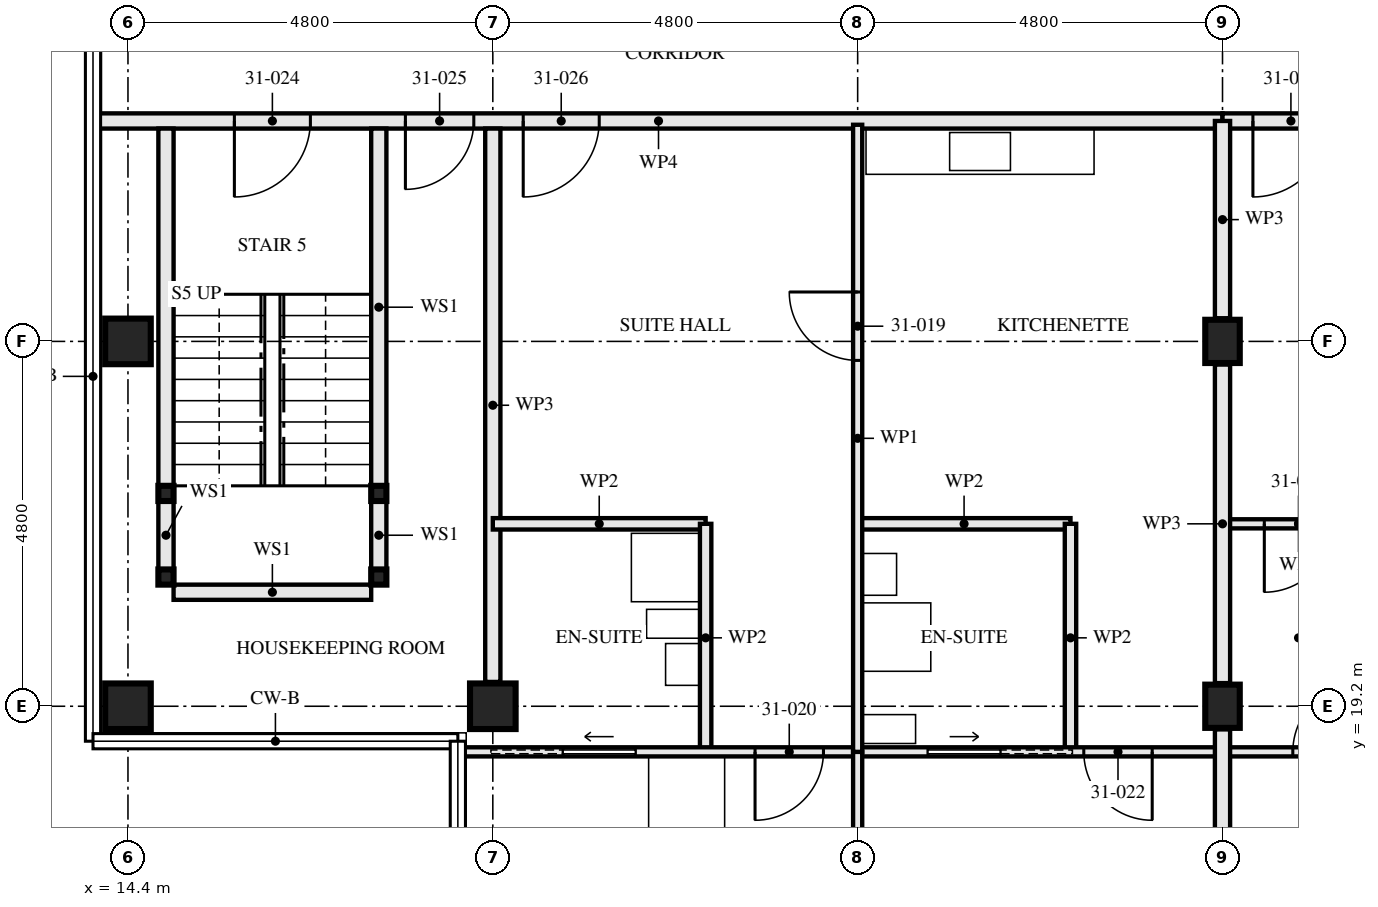
"""IFC4 building model, lengths in metres.
Left out: names, types, materials, properties, quantities, classifications, styles, units other than length and angle.
Written with IfcOpenShell. Run it as: python <this file> out.ifc"""

import sys

from ifc_helpers import new_model, si_unit, direction, frame, frame_2d, origin, origin_2d, place, context, subcontext, project, spatial, rectangle, hollow_rectangle, i_section, extrude, element, fill, save


model = new_model("IFC4")
c1 = context("Model", 3, precision=1e-05, world=origin(), true_north=direction((0.0, 1.0)))
c2 = subcontext(c1, "Body", "Model", "MODEL_VIEW")
j1 = project(units=[si_unit("LENGTHUNIT", "METRE"), si_unit("PLANEANGLEUNIT", "RADIAN")], contexts=[c1])
p1 = place(None, origin())
s1 = spatial("IfcSite", under=j1, at=p1, CompositionType="ELEMENT")
p2 = place(p1, origin())
s2 = spatial("IfcBuilding", under=s1, at=p2, CompositionType="ELEMENT")
p3 = place(p2, frame((0.0, 0.0, 115.5)))
s3 = spatial("IfcBuildingStorey", under=s2, at=p3, CompositionType="ELEMENT", Elevation=115.5)
for number, where, z_axis, x_axis in (
    (1, (14.4, 19.2, 0.0), (0.0, 0.0, 1.0), (0.0, 1.0, 0.0)),
    (2, (14.4, 24.0, 0.0), (0.0, 0.0, 1.0), (1.0, 0.0, 0.0)),
    (3, (19.2, 19.2, 0.0), (0.0, 0.0, 1.0), (0.0, 1.0, 0.0)),
):
    element("IfcColumn", number, at=place(p3, frame(where, z_axis=z_axis, x_axis=x_axis)), inside=s3, PredefinedType="COLUMN", context=c2, shape_type="SweptSolid", body=[
        extrude(hollow_rectangle(XDim=0.6, YDim=0.6, WallThickness=0.08, at=origin_2d()), origin(), (0.0, 0.0, 1.0), 3.5),
    ])
for number, where, z_axis, x_axis in (
    (4, (28.8, 19.2, 0.0), (0.0, 0.0, 1.0), (1.0, 0.0, 0.0)),
    (5, (28.8, 24.0, 0.0), (0.0, 0.0, 1.0), (1.0, 0.0, 0.0)),
):
    element("IfcColumn", number, at=place(p3, frame(where, z_axis=z_axis, x_axis=x_axis)), inside=s3, PredefinedType="COLUMN", context=c2, shape_type="SweptSolid", body=[
        extrude(i_section(OverallWidth=0.454, OverallDepth=0.569, WebThickness=0.078, FlangeThickness=0.125, FilletRadius=0.015, at=origin_2d()), origin(), (0.0, 0.0, 1.0), 3.5),
    ])
for number, where, z_axis, x_axis in (
    (6, (14.9, 20.9, 0.0), (0.0, 0.0, 1.0), (1.0, 0.0, 0.0)),
    (7, (17.7, 20.9, 0.0), (0.0, 0.0, 1.0), (1.0, 0.0, 0.0)),
    (8, (14.9, 22.0, 0.0), (0.0, 0.0, 1.0), (1.0, 0.0, 0.0)),
    (9, (17.7, 22.0, 0.0), (0.0, 0.0, 1.0), (1.0, 0.0, 0.0)),
):
    element("IfcColumn", number, at=place(p3, frame(where, z_axis=z_axis, x_axis=x_axis)), inside=s3, PredefinedType="COLUMN", context=c2, shape_type="SweptSolid", body=[
        extrude(hollow_rectangle(XDim=0.2, YDim=0.2, WallThickness=0.008, at=origin_2d()), origin(), (0.0, 0.0, 1.0), 3.33),
    ])
p4 = place(p3, frame((14.9, 21.0, 0.0), z_axis=(0.0, 0.0, 1.0), x_axis=(0.0, 1.0, 0.0)))
e10 = element("IfcWall", 10, at=p4, inside=s3, PredefinedType="SOLIDWALL", context=c2, shape_type="SweptSolid", body=[
    extrude(rectangle(XDim=0.9, YDim=0.2, at=frame_2d((0.45, 0.0))), origin(), (0.0, 0.0, 1.0), 2.99),
])
p5 = place(p3, frame((14.9, 22.1, 0.0), z_axis=(0.0, 0.0, 1.0), x_axis=(0.0, 1.0, 0.0)))
e11 = element("IfcWall", 11, at=p5, inside=s3, PredefinedType="SOLIDWALL", context=c2, shape_type="SweptSolid", body=[
    extrude(rectangle(XDim=4.7, YDim=0.2, at=frame_2d((2.35, 0.0))), origin(), (0.0, 0.0, 1.0), 2.99),
])
p6 = place(p3, frame((17.7, 21.0, 0.0), z_axis=(0.0, 0.0, 1.0), x_axis=(0.0, 1.0, 0.0)))
e12 = element("IfcWall", 12, at=p6, inside=s3, PredefinedType="SOLIDWALL", context=c2, shape_type="SweptSolid", body=[
    extrude(rectangle(XDim=0.9, YDim=0.2, at=frame_2d((0.45, 0.0))), origin(), (0.0, 0.0, 1.0), 2.99),
])
p7 = place(p3, frame((17.7, 22.1, 0.0), z_axis=(0.0, 0.0, 1.0), x_axis=(0.0, 1.0, 0.0)))
e13 = element("IfcWall", 13, at=p7, inside=s3, PredefinedType="SOLIDWALL", context=c2, shape_type="SweptSolid", body=[
    extrude(rectangle(XDim=4.7, YDim=0.2, at=frame_2d((2.35, 0.0))), origin(), (0.0, 0.0, 1.0), 2.99),
])
p8 = place(p3, frame((15.0, 20.7, 0.0), z_axis=(0.0, 0.0, 1.0), x_axis=(1.0, 0.0, 0.0)))
e14 = element("IfcWall", 14, at=p8, inside=s3, PredefinedType="SOLIDWALL", context=c2, shape_type="SweptSolid", body=[
    extrude(rectangle(XDim=2.6, YDim=0.2, at=frame_2d((1.3, 0.0))), origin(), (0.0, 0.0, 1.0), 3.33),
])
p9 = place(p3, frame((19.2, 19.52, 0.0), z_axis=(0.0, 0.0, 1.0), x_axis=(0.0, 1.0, 0.0)))
e15 = element("IfcWall", 15, at=p9, inside=s3, PredefinedType="PARTITIONING", context=c2, shape_type="SweptSolid", body=[
    extrude(rectangle(XDim=7.28, YDim=0.2, at=frame_2d((3.64, 0.0))), origin(), (0.0, 0.0, 1.0), 2.55),
])
p10 = place(p3, frame((22.0, 18.6, 0.0), z_axis=(0.0, 0.0, 1.0), x_axis=(0.0, 1.0, 0.0)))
e16 = element("IfcWall", 16, at=p10, inside=s3, PredefinedType="PARTITIONING", context=c2, shape_type="SweptSolid", body=[
    extrude(rectangle(XDim=3.0, YDim=0.15, at=frame_2d((1.5, 0.0))), origin(), (0.0, 0.0, 1.0), 2.55),
])
p11 = place(p3, frame((19.2, 21.6, 0.0), z_axis=(0.0, 0.0, 1.0), x_axis=(1.0, 0.0, 0.0)))
e17 = element("IfcWall", 17, at=p11, inside=s3, PredefinedType="PARTITIONING", context=c2, shape_type="SweptSolid", body=[
    extrude(rectangle(XDim=2.8, YDim=0.15, at=frame_2d((1.4, 0.0))), origin(), (0.0, 0.0, 1.0), 3.33),
])
p12 = place(p3, frame((26.8, 18.6, 0.0), z_axis=(0.0, 0.0, 1.0), x_axis=(0.0, 1.0, 0.0)))
e18 = element("IfcWall", 18, at=p12, inside=s3, PredefinedType="PARTITIONING", context=c2, shape_type="SweptSolid", body=[
    extrude(rectangle(XDim=3.0, YDim=0.15, at=frame_2d((1.5, 0.0))), origin(), (0.0, 0.0, 1.0), 2.55),
])
p13 = place(p3, frame((24.0, 21.6, 0.0), z_axis=(0.0, 0.0, 1.0), x_axis=(1.0, 0.0, 0.0)))
e19 = element("IfcWall", 19, at=p13, inside=s3, PredefinedType="PARTITIONING", context=c2, shape_type="SweptSolid", body=[
    extrude(rectangle(XDim=2.8, YDim=0.15, at=frame_2d((1.4, 0.0))), origin(), (0.0, 0.0, 1.0), 3.33),
])
p14 = place(p3, frame((24.0, 18.6, 0.0), z_axis=(0.0, 0.0, 1.0), x_axis=(0.0, 1.0, 0.0)))
e20 = element("IfcWall", 20, at=p14, inside=s3, PredefinedType="PARTITIONING", context=c2, shape_type="SweptSolid", body=[
    extrude(rectangle(XDim=8.25, YDim=0.12, at=frame_2d((4.125, 0.0))), origin(), (0.0, 0.0, 1.0), 2.55),
])
p15 = place(p14, frame((5.15, 0.0, 0.0)))
e21 = element("IfcOpeningElement", 21, at=p15, cuts=e20, PredefinedType="OPENING", context=c2, shape_type="SweptSolid", body=[
    extrude(rectangle(XDim=0.9, YDim=2.1, at=frame_2d((0.45, 1.05))), frame((0.0, 0.071, 0.0), z_axis=(0.0, -1.0, 0.0), x_axis=(1.0, 0.0, 0.0)), (0.0, 0.0, 1.0), 0.141),
])
p16 = place(p3, frame((18.76, 18.6, 0.0), z_axis=(0.0, 0.0, 1.0), x_axis=(1.0, 0.0, 0.0)))
e22 = element("IfcWall", 22, at=p16, inside=s3, PredefinedType="PARTITIONING", context=c2, shape_type="SweptSolid", body=[
    extrude(rectangle(XDim=5.24, YDim=0.12, at=frame_2d((2.62, 0.0))), origin(), (0.0, 0.0, 1.0), 2.32),
])
p17 = place(p16, frame((3.89, 0.0, 0.0)))
e23 = element("IfcOpeningElement", 23, at=p17, cuts=e22, PredefinedType="OPENING", context=c2, shape_type="SweptSolid", body=[
    extrude(rectangle(XDim=0.9, YDim=2.1, at=frame_2d((0.45, 1.05))), frame((0.0, 0.071, 0.0), z_axis=(0.0, -1.0, 0.0), x_axis=(1.0, 0.0, 0.0)), (0.0, 0.0, 1.0), 0.141),
])
p18 = place(p16, frame((1.365, 0.0, 0.0)))
e24 = element("IfcOpeningElement", 24, at=p18, cuts=e22, PredefinedType="OPENING", context=c2, shape_type="SweptSolid", body=[
    extrude(rectangle(XDim=0.95, YDim=2.1, at=frame_2d((0.475, 1.05))), frame((0.0, 0.071, 0.0), z_axis=(0.0, -1.0, 0.0), x_axis=(1.0, 0.0, 0.0)), (0.0, 0.0, 1.0), 0.141),
])
p19 = place(p3, frame((24.0, 18.6, 0.0), z_axis=(0.0, 0.0, 1.0), x_axis=(1.0, 0.0, 0.0)))
e25 = element("IfcWall", 25, at=p19, inside=s3, PredefinedType="PARTITIONING", context=c2, shape_type="SweptSolid", body=[
    extrude(rectangle(XDim=4.8, YDim=0.12, at=frame_2d((2.4, 0.0))), origin(), (0.0, 0.0, 1.0), 3.33),
])
p20 = place(p19, frame((2.975, 0.0, 0.0)))
e26 = element("IfcOpeningElement", 26, at=p20, cuts=e25, PredefinedType="OPENING", context=c2, shape_type="SweptSolid", body=[
    extrude(rectangle(XDim=0.9, YDim=2.1, at=frame_2d((0.45, 1.05))), frame((0.0, 0.071, 0.0), z_axis=(0.0, -1.0, 0.0), x_axis=(1.0, 0.0, 0.0)), (0.0, 0.0, 1.0), 0.141),
])
p21 = place(p19, frame((0.925, 0.0, 0.0)))
e27 = element("IfcOpeningElement", 27, at=p21, cuts=e25, PredefinedType="OPENING", context=c2, shape_type="SweptSolid", body=[
    extrude(rectangle(XDim=0.95, YDim=2.1, at=frame_2d((0.475, 1.05))), frame((0.0, 0.071, 0.0), z_axis=(0.0, -1.0, 0.0), x_axis=(1.0, 0.0, 0.0)), (0.0, 0.0, 1.0), 0.141),
])
p22 = place(p3, frame((24.0, 14.72, 0.0), z_axis=(0.0, 0.0, 1.0), x_axis=(0.0, 1.0, 0.0)))
e28 = element("IfcWall", 28, at=p22, inside=s3, PredefinedType="PARTITIONING", context=c2, shape_type="SweptSolid", body=[
    extrude(rectangle(XDim=3.88, YDim=0.12, at=frame_2d((1.94, 0.0))), origin(), (0.0, 0.0, 1.0), 3.33),
])
p23 = place(p3, frame((13.96, 26.9, 0.0), z_axis=(0.0, 0.0, 1.0), x_axis=(1.0, 0.0, 0.0)))
e29 = element("IfcWall", 29, at=p23, inside=s3, PredefinedType="PARTITIONING", context=c2, shape_type="SweptSolid", body=[
    extrude(rectangle(XDim=14.84, YDim=0.2, at=frame_2d((7.42, 0.0))), origin(), (0.0, 0.0, 1.0), 2.32),
])
p24 = place(p23, frame((1.84, 0.0, 0.0)))
e30 = element("IfcOpeningElement", 30, at=p24, cuts=e29, PredefinedType="OPENING", context=c2, shape_type="SweptSolid", body=[
    extrude(rectangle(XDim=1.0, YDim=2.1, at=frame_2d((0.5, 1.05))), frame((0.0, 0.111, 0.0), z_axis=(0.0, -1.0, 0.0), x_axis=(1.0, 0.0, 0.0)), (0.0, 0.0, 1.0), 0.221),
])
p25 = place(p23, frame((4.09, 0.0, 0.0)))
e31 = element("IfcOpeningElement", 31, at=p25, cuts=e29, PredefinedType="OPENING", context=c2, shape_type="SweptSolid", body=[
    extrude(rectangle(XDim=0.9, YDim=2.1, at=frame_2d((0.45, 1.05))), frame((0.0, 0.111, 0.0), z_axis=(0.0, -1.0, 0.0), x_axis=(1.0, 0.0, 0.0)), (0.0, 0.0, 1.0), 0.221),
])
p26 = place(p23, frame((5.64, 0.0, 0.0)))
e32 = element("IfcOpeningElement", 32, at=p26, cuts=e29, PredefinedType="OPENING", context=c2, shape_type="SweptSolid", body=[
    extrude(rectangle(XDim=1.0, YDim=2.1, at=frame_2d((0.5, 1.05))), frame((0.0, 0.111, 0.0), z_axis=(0.0, -1.0, 0.0), x_axis=(1.0, 0.0, 0.0)), (0.0, 0.0, 1.0), 0.221),
])
p27 = place(p3, frame((28.8, 21.6, 0.0), z_axis=(0.0, 0.0, 1.0), x_axis=(1.0, 0.0, 0.0)))
e33 = element("IfcWall", 33, at=p27, inside=s3, PredefinedType="PARTITIONING", context=c2, shape_type="SweptSolid", body=[
    extrude(rectangle(XDim=2.0, YDim=0.12, at=frame_2d((1.0, 0.0))), origin(), (0.0, 0.0, 1.0), 3.33),
])
p28 = place(p27, frame((0.55, 0.0, 0.0)))
e34 = element("IfcOpeningElement", 34, at=p28, cuts=e33, PredefinedType="OPENING", context=c2, shape_type="SweptSolid", body=[
    extrude(rectangle(XDim=0.9, YDim=2.1, at=frame_2d((0.45, 1.05))), frame((0.0, 0.071, 0.0), z_axis=(0.0, -1.0, 0.0), x_axis=(1.0, 0.0, 0.0)), (0.0, 0.0, 1.0), 0.141),
])
p29 = place(p3, frame((28.8, 18.6, 0.0), z_axis=(0.0, 0.0, 1.0), x_axis=(1.0, 0.0, 0.0)))
e35 = element("IfcWall", 35, at=p29, inside=s3, PredefinedType="PARTITIONING", context=c2, shape_type="SweptSolid", body=[
    extrude(rectangle(XDim=4.8, YDim=0.12, at=frame_2d((2.4, 0.0))), origin(), (0.0, 0.0, 1.0), 3.33),
])
p30 = place(p29, frame((0.925, 0.0, 0.0)))
e36 = element("IfcOpeningElement", 36, at=p30, cuts=e35, PredefinedType="OPENING", context=c2, shape_type="SweptSolid", body=[
    extrude(rectangle(XDim=0.9, YDim=2.1, at=frame_2d((0.45, 1.05))), frame((0.0, 0.071, 0.0), z_axis=(0.0, -1.0, 0.0), x_axis=(1.0, 0.0, 0.0)), (0.0, 0.0, 1.0), 0.141),
])
p31 = place(p29, frame((2.925, 0.0, 0.0)))
e37 = element("IfcOpeningElement", 37, at=p31, cuts=e35, PredefinedType="OPENING", context=c2, shape_type="SweptSolid", body=[
    extrude(rectangle(XDim=0.95, YDim=2.1, at=frame_2d((0.475, 1.05))), frame((0.0, 0.071, 0.0), z_axis=(0.0, -1.0, 0.0), x_axis=(1.0, 0.0, 0.0)), (0.0, 0.0, 1.0), 0.141),
])
p32 = place(p3, frame((28.8, 26.9, 0.0), z_axis=(0.0, 0.0, 1.0), x_axis=(1.0, 0.0, 0.0)))
e38 = element("IfcWall", 38, at=p32, inside=s3, PredefinedType="PARTITIONING", context=c2, shape_type="SweptSolid", body=[
    extrude(rectangle(XDim=9.6, YDim=0.2, at=frame_2d((4.8, 0.0))), origin(), (0.0, 0.0, 1.0), 3.33),
])
p33 = place(p32, frame((0.4, 0.0, 0.0)))
e39 = element("IfcOpeningElement", 39, at=p33, cuts=e38, PredefinedType="OPENING", context=c2, shape_type="SweptSolid", body=[
    extrude(rectangle(XDim=1.0, YDim=2.1, at=frame_2d((0.5, 1.05))), frame((0.0, 0.111, 0.0), z_axis=(0.0, -1.0, 0.0), x_axis=(1.0, 0.0, 0.0)), (0.0, 0.0, 1.0), 0.221),
])
p34 = place(p32, frame((5.2, 0.0, 0.0)))
e40 = element("IfcOpeningElement", 40, at=p34, cuts=e38, PredefinedType="OPENING", context=c2, shape_type="SweptSolid", body=[
    extrude(rectangle(XDim=1.0, YDim=2.1, at=frame_2d((0.5, 1.05))), frame((0.0, 0.111, 0.0), z_axis=(0.0, -1.0, 0.0), x_axis=(1.0, 0.0, 0.0)), (0.0, 0.0, 1.0), 0.221),
])
p35 = place(p3, frame((28.8, 14.644, 0.0), z_axis=(0.0, 0.0, 1.0), x_axis=(0.0, 1.0, 0.0)))
e41 = element("IfcWall", 41, at=p35, inside=s3, PredefinedType="PARTITIONING", context=c2, shape_type="SweptSolid", body=[
    extrude(rectangle(XDim=4.251, YDim=0.2, at=frame_2d((2.126, 0.0))), origin(), (0.0, 0.0, 1.0), 2.32),
])
p36 = place(p3, frame((28.8, 19.504, 0.0), z_axis=(0.0, 0.0, 1.0), x_axis=(0.0, 1.0, 0.0)))
e42 = element("IfcWall", 42, at=p36, inside=s3, PredefinedType="PARTITIONING", context=c2, shape_type="SweptSolid", body=[
    extrude(rectangle(XDim=4.191, YDim=0.2, at=frame_2d((2.096, 0.0))), origin(), (0.0, 0.0, 1.0), 2.32),
])
p37 = place(p3, frame((28.8, 24.304, 0.0), z_axis=(0.0, 0.0, 1.0), x_axis=(0.0, 1.0, 0.0)))
e43 = element("IfcWall", 43, at=p37, inside=s3, PredefinedType="PARTITIONING", context=c2, shape_type="SweptSolid", body=[
    extrude(rectangle(XDim=2.595, YDim=0.2, at=frame_2d((1.298, 0.0))), origin(), (0.0, 0.0, 1.0), 2.32),
])
p38 = place(p15, origin())
e44 = element("IfcDoor", 44, at=p38, inside=s3, OperationType="SINGLE_SWING_LEFT", PredefinedType="DOOR", context=c2, shape_type="SweptSolid", body=[
    extrude(rectangle(XDim=0.9, YDim=2.1, at=frame_2d((0.45, 1.05))), frame((0.0, 0.022, 0.0), z_axis=(0.0, -1.0, 0.0), x_axis=(1.0, 0.0, 0.0)), (0.0, 0.0, 1.0), 0.044),
])
fill(e21, e44)
p39 = place(p17, frame((0.9, 0.0, 0.0), z_axis=(0.0, 0.0, 1.0), x_axis=(-1.0, 0.0, 0.0)))
e45 = element("IfcDoor", 45, at=p39, inside=s3, OperationType="SINGLE_SWING_LEFT", PredefinedType="DOOR", context=c2, shape_type="SweptSolid", body=[
    extrude(rectangle(XDim=0.9, YDim=2.1, at=frame_2d((0.45, 1.05))), frame((0.0, 0.022, 0.0), z_axis=(0.0, -1.0, 0.0), x_axis=(1.0, 0.0, 0.0)), (0.0, 0.0, 1.0), 0.044),
])
fill(e23, e45)
p40 = place(p18, origin())
e46 = element("IfcDoor", 46, at=p40, inside=s3, OperationType="SLIDING_TO_RIGHT", PredefinedType="DOOR", context=c2, shape_type="SweptSolid", body=[
    extrude(rectangle(XDim=0.95, YDim=2.1, at=frame_2d((0.475, 1.05))), frame((0.0, 0.022, 0.0), z_axis=(0.0, -1.0, 0.0), x_axis=(1.0, 0.0, 0.0)), (0.0, 0.0, 1.0), 0.044),
])
fill(e24, e46)
p41 = place(p20, frame((0.9, 0.0, 0.0), z_axis=(0.0, 0.0, 1.0), x_axis=(-1.0, 0.0, 0.0)))
e47 = element("IfcDoor", 47, at=p41, inside=s3, OperationType="SINGLE_SWING_RIGHT", PredefinedType="DOOR", context=c2, shape_type="SweptSolid", body=[
    extrude(rectangle(XDim=0.9, YDim=2.1, at=frame_2d((0.45, 1.05))), frame((0.0, 0.022, 0.0), z_axis=(0.0, -1.0, 0.0), x_axis=(1.0, 0.0, 0.0)), (0.0, 0.0, 1.0), 0.044),
])
fill(e26, e47)
p42 = place(p21, origin())
e48 = element("IfcDoor", 48, at=p42, inside=s3, OperationType="SLIDING_TO_LEFT", PredefinedType="DOOR", context=c2, shape_type="SweptSolid", body=[
    extrude(rectangle(XDim=0.95, YDim=2.1, at=frame_2d((0.475, 1.05))), frame((0.0, 0.022, 0.0), z_axis=(0.0, -1.0, 0.0), x_axis=(1.0, 0.0, 0.0)), (0.0, 0.0, 1.0), 0.044),
])
fill(e27, e48)
p43 = place(p24, frame((1.0, 0.0, 0.0), z_axis=(0.0, 0.0, 1.0), x_axis=(-1.0, 0.0, 0.0)))
e49 = element("IfcDoor", 49, at=p43, inside=s3, OperationType="SINGLE_SWING_LEFT", PredefinedType="DOOR", context=c2, shape_type="SweptSolid", body=[
    extrude(rectangle(XDim=1.0, YDim=2.1, at=frame_2d((0.5, 1.05))), frame((0.0, 0.032, 0.0), z_axis=(0.0, -1.0, 0.0), x_axis=(1.0, 0.0, 0.0)), (0.0, 0.0, 1.0), 0.064),
])
fill(e30, e49)
p44 = place(p25, frame((0.9, 0.0, 0.0), z_axis=(0.0, 0.0, 1.0), x_axis=(-1.0, 0.0, 0.0)))
e50 = element("IfcDoor", 50, at=p44, inside=s3, OperationType="SINGLE_SWING_LEFT", PredefinedType="DOOR", context=c2, shape_type="SweptSolid", body=[
    extrude(rectangle(XDim=0.9, YDim=2.1, at=frame_2d((0.45, 1.05))), frame((0.0, 0.027, 0.0), z_axis=(0.0, -1.0, 0.0), x_axis=(1.0, 0.0, 0.0)), (0.0, 0.0, 1.0), 0.054),
])
fill(e31, e50)
p45 = place(p26, frame((1.0, 0.0, 0.0), z_axis=(0.0, 0.0, 1.0), x_axis=(-1.0, 0.0, 0.0)))
e51 = element("IfcDoor", 51, at=p45, inside=s3, OperationType="SINGLE_SWING_LEFT", PredefinedType="DOOR", context=c2, shape_type="SweptSolid", body=[
    extrude(rectangle(XDim=1.0, YDim=2.1, at=frame_2d((0.5, 1.05))), frame((0.0, 0.027, 0.0), z_axis=(0.0, -1.0, 0.0), x_axis=(1.0, 0.0, 0.0)), (0.0, 0.0, 1.0), 0.054),
])
fill(e32, e51)
p46 = place(p28, frame((0.9, 0.0, 0.0), z_axis=(0.0, 0.0, 1.0), x_axis=(-1.0, 0.0, 0.0)))
e52 = element("IfcDoor", 52, at=p46, inside=s3, OperationType="SINGLE_SWING_LEFT", PredefinedType="DOOR", context=c2, shape_type="SweptSolid", body=[
    extrude(rectangle(XDim=0.9, YDim=2.1, at=frame_2d((0.45, 1.05))), frame((0.0, 0.022, 0.0), z_axis=(0.0, -1.0, 0.0), x_axis=(1.0, 0.0, 0.0)), (0.0, 0.0, 1.0), 0.044),
])
fill(e34, e52)
p47 = place(p30, origin())
e53 = element("IfcDoor", 53, at=p47, inside=s3, OperationType="SINGLE_SWING_LEFT", PredefinedType="DOOR", context=c2, shape_type="SweptSolid", body=[
    extrude(rectangle(XDim=0.9, YDim=2.1, at=frame_2d((0.45, 1.05))), frame((0.0, 0.022, 0.0), z_axis=(0.0, -1.0, 0.0), x_axis=(1.0, 0.0, 0.0)), (0.0, 0.0, 1.0), 0.044),
])
fill(e36, e53)
p48 = place(p33, frame((1.0, 0.0, 0.0), z_axis=(0.0, 0.0, 1.0), x_axis=(-1.0, 0.0, 0.0)))
e54 = element("IfcDoor", 54, at=p48, inside=s3, OperationType="SINGLE_SWING_LEFT", PredefinedType="DOOR", context=c2, shape_type="SweptSolid", body=[
    extrude(rectangle(XDim=1.0, YDim=2.1, at=frame_2d((0.5, 1.05))), frame((0.0, 0.027, 0.0), z_axis=(0.0, -1.0, 0.0), x_axis=(1.0, 0.0, 0.0)), (0.0, 0.0, 1.0), 0.054),
])
fill(e39, e54)
save(model, sys.argv[1])
